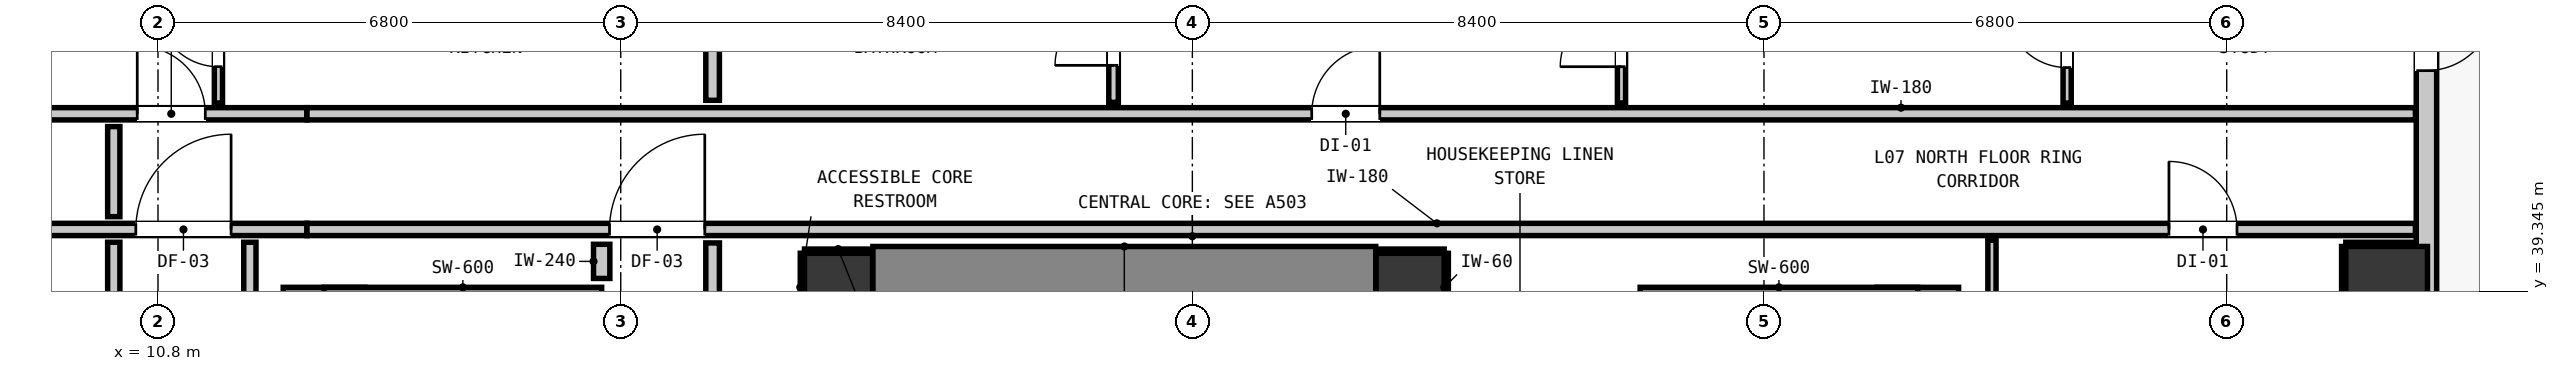
"""IFC4 building model, lengths in metres.
Left out: names, types, materials, properties, quantities, classifications, styles, units other than length and angle.
Written with IfcOpenShell. Run it as: python <this file> out.ifc"""

import sys

from ifc_helpers import new_model, si_unit, direction, frame, frame_2d, origin, origin_2d, place, context, subcontext, project, spatial, rectangle, extrude, element, fill, save


model = new_model("IFC4")
c1 = context("Model", 3, precision=1e-05, world=origin(), true_north=direction((0.0, 1.0)))
c2 = subcontext(c1, "Body", "Model", "MODEL_VIEW")
j1 = project(units=[si_unit("LENGTHUNIT", "METRE"), si_unit("PLANEANGLEUNIT", "RADIAN")], contexts=[c1])
p1 = place(None, origin())
s1 = spatial("IfcSite", under=j1, at=p1, CompositionType="ELEMENT")
p2 = place(p1, origin())
s2 = spatial("IfcBuilding", under=s1, at=p2, CompositionType="ELEMENT")
p3 = place(p2, frame((0.0, 0.0, 28.64)))
s3 = spatial("IfcBuildingStorey", under=s2, at=p3, CompositionType="ELEMENT", Elevation=28.64)
for number, where, z_axis, x_axis in (
    (1, (20.8, 39.4, 0.0), (0.0, 0.0, 1.0), (1.0, 0.0, 0.0)),
    (2, (29.2, 39.4, 0.0), (0.0, 0.0, 1.0), (1.0, 0.0, 0.0)),
):
    element("IfcColumn", number, at=place(p3, frame(where, z_axis=z_axis, x_axis=x_axis)), inside=s3, PredefinedType="COLUMN", context=c2, shape_type="SweptSolid", body=[
        extrude(rectangle(XDim=1.0, YDim=1.0, at=origin_2d()), origin(), (0.0, 0.0, 1.0), 3.32),
    ])
p4 = place(p3, frame((13.24, 31.205, 0.0), z_axis=(0.0, 0.0, 1.0), x_axis=(0.0, 1.0, 0.0)))
e3 = element("IfcWall", 3, at=p4, inside=s3, PredefinedType="SHEAR", context=c2, shape_type="SweptSolid", body=[
    extrude(rectangle(XDim=8.195, YDim=1.2, at=frame_2d((4.097, 0.0))), origin(), (0.0, 0.0, 1.0), 3.32),
])
p5 = place(p3, frame((13.24, 39.1, 0.0), z_axis=(0.0, 0.0, 1.0), x_axis=(1.0, 0.0, 0.0)))
e4 = element("IfcWall", 4, at=p5, inside=s3, PredefinedType="SHEAR", context=c2, shape_type="SweptSolid", body=[
    extrude(rectangle(XDim=4.08, YDim=0.6, at=frame_2d((2.04, 0.0))), origin(), (0.0, 0.0, 1.0), 3.32),
])
p6 = place(p3, frame((36.66, 31.205, 0.0), z_axis=(0.0, 0.0, 1.0), x_axis=(0.0, 1.0, 0.0)))
e5 = element("IfcWall", 5, at=p6, inside=s3, PredefinedType="SHEAR", context=c2, shape_type="SweptSolid", body=[
    extrude(rectangle(XDim=8.195, YDim=1.2, at=frame_2d((4.097, 0.0))), origin(), (0.0, 0.0, 1.0), 3.32),
])
p7 = place(p3, frame((32.58, 39.1, 0.0), z_axis=(0.0, 0.0, 1.0), x_axis=(1.0, 0.0, 0.0)))
e6 = element("IfcWall", 6, at=p7, inside=s3, PredefinedType="SHEAR", context=c2, shape_type="SweptSolid", body=[
    extrude(rectangle(XDim=4.08, YDim=0.6, at=frame_2d((2.04, 0.0))), origin(), (0.0, 0.0, 1.0), 3.32),
])
p8 = place(p3, frame((21.305, 39.4, 0.0), z_axis=(0.0, 0.0, 1.0), x_axis=(1.0, 0.0, 0.0)))
e7 = element("IfcWall", 7, at=p8, inside=s3, PredefinedType="SHEAR", context=c2, shape_type="SweptSolid", body=[
    extrude(rectangle(XDim=7.39, YDim=1.2, at=frame_2d((3.695, 0.0))), origin(), (0.0, 0.0, 1.0), 3.32),
])
p9 = place(p3, frame((43.55, 39.4, 0.0), z_axis=(0.0, 0.0, 1.0), x_axis=(1.0, 0.0, 0.0)))
e8 = element("IfcColumn", 8, at=p9, inside=s3, PredefinedType="COLUMN", context=c2, shape_type="SweptSolid", body=[
    extrude(rectangle(XDim=1.2, YDim=1.2, at=origin_2d()), origin(), (0.0, 0.0, 1.0), 3.32),
])
p10 = place(p3, frame((44.135, 44.835, 0.0), z_axis=(0.0, 0.0, 1.0), x_axis=(0.0, -1.0, 0.0)))
e9 = element("IfcWall", 9, at=p10, inside=s3, PredefinedType="STANDARD", context=c2, shape_type="SweptSolid", body=[
    extrude(rectangle(XDim=34.67, YDim=0.3, at=frame_2d((17.335, 0.0))), origin(), (0.0, 0.0, 1.0), 3.06),
])
p11 = place(p10, frame((1.251, 0.0, 0.0)))
e10 = element("IfcOpeningElement", 10, at=p11, cuts=e9, PredefinedType="OPENING", context=c2, shape_type="SweptSolid", body=[
    extrude(rectangle(XDim=1.0, YDim=2.15, at=frame_2d((0.5, 1.075))), frame((0.0, 0.16, 0.0), z_axis=(0.0, -1.0, 0.0), x_axis=(1.0, 0.0, 0.0)), (0.0, 0.0, 1.0), 0.32),
])
p12 = place(p10, frame((32.733, 0.0, 0.85)))
e11 = element("IfcOpeningElement", 11, at=p12, cuts=e9, PredefinedType="OPENING", context=c2, shape_type="SweptSolid", body=[
    extrude(rectangle(XDim=1.05, YDim=1.65, at=frame_2d((0.525, 0.825))), frame((0.0, 0.16, 0.0), z_axis=(0.0, -1.0, 0.0), x_axis=(1.0, 0.0, 0.0)), (0.0, 0.0, 1.0), 0.32),
])
p13 = place(p10, frame((17.135, 0.0, 0.85)))
e12 = element("IfcOpeningElement", 12, at=p13, cuts=e9, PredefinedType="OPENING", context=c2, shape_type="SweptSolid", body=[
    extrude(rectangle(XDim=2.7, YDim=2.0, at=frame_2d((1.35, 1.0))), frame((0.0, 0.16, 0.0), z_axis=(0.0, -1.0, 0.0), x_axis=(1.0, 0.0, 0.0)), (0.0, 0.0, 1.0), 0.32),
])
p14 = place(p10, frame((6.984, 0.0, 0.85)))
e13 = element("IfcOpeningElement", 13, at=p14, cuts=e9, PredefinedType="OPENING", context=c2, shape_type="SweptSolid", body=[
    extrude(rectangle(XDim=1.05, YDim=1.65, at=frame_2d((0.525, 0.825))), frame((0.0, 0.16, 0.0), z_axis=(0.0, -1.0, 0.0), x_axis=(1.0, 0.0, 0.0)), (0.0, 0.0, 1.0), 0.32),
])
p15 = place(p3, frame((2.661, 40.25, 0.0), z_axis=(0.0, 0.0, 1.0), x_axis=(1.0, 0.0, 0.0)))
e14 = element("IfcWall", 14, at=p15, inside=s3, PredefinedType="PARTITIONING", context=c2, shape_type="SweptSolid", body=[
    extrude(rectangle(XDim=10.328, YDim=0.18, at=frame_2d((5.164, 0.0))), origin(), (0.0, 0.0, 1.0), 2.445),
])
p16 = place(p15, frame((7.813, 0.0, 0.0)))
e15 = element("IfcOpeningElement", 15, at=p16, cuts=e14, PredefinedType="OPENING", context=c2, shape_type="SweptSolid", body=[
    extrude(rectangle(XDim=1.4, YDim=2.15, at=frame_2d((0.7, 1.075))), frame((0.0, 0.1, 0.0), z_axis=(0.0, -1.0, 0.0), x_axis=(1.0, 0.0, 0.0)), (0.0, 0.0, 1.0), 0.2),
])
p17 = place(p3, frame((12.989, 40.25, 0.0), z_axis=(0.0, 0.0, 1.0), x_axis=(1.0, 0.0, 0.0)))
e16 = element("IfcWall", 16, at=p17, inside=s3, PredefinedType="PARTITIONING", context=c2, shape_type="SweptSolid", body=[
    extrude(rectangle(XDim=30.984, YDim=0.18, at=frame_2d((15.492, 0.0))), origin(), (0.0, 0.0, 1.0), 3.06),
])
p18 = place(p17, frame((4.446, 0.0, 0.0)))
e17 = element("IfcOpeningElement", 17, at=p18, cuts=e16, PredefinedType="OPENING", context=c2, shape_type="SweptSolid", body=[
    extrude(rectangle(XDim=1.4, YDim=2.15, at=frame_2d((0.7, 1.075))), frame((0.0, 0.1, 0.0), z_axis=(0.0, -1.0, 0.0), x_axis=(1.0, 0.0, 0.0)), (0.0, 0.0, 1.0), 0.2),
])
p19 = place(p17, frame((27.362, 0.0, 0.0)))
e18 = element("IfcOpeningElement", 18, at=p19, cuts=e16, PredefinedType="OPENING", context=c2, shape_type="SweptSolid", body=[
    extrude(rectangle(XDim=1.0, YDim=2.15, at=frame_2d((0.5, 1.075))), frame((0.0, 0.1, 0.0), z_axis=(0.0, -1.0, 0.0), x_axis=(1.0, 0.0, 0.0)), (0.0, 0.0, 1.0), 0.2),
])
p20 = place(p3, frame((2.661, 41.95, 0.0), z_axis=(0.0, 0.0, 1.0), x_axis=(1.0, 0.0, 0.0)))
e19 = element("IfcWall", 19, at=p20, inside=s3, PredefinedType="PARTITIONING", context=c2, shape_type="SweptSolid", body=[
    extrude(rectangle(XDim=10.328, YDim=0.18, at=frame_2d((5.164, 0.0))), origin(), (0.0, 0.0, 1.0), 2.445),
])
p21 = place(p20, frame((7.834, 0.0, 0.0)))
e20 = element("IfcOpeningElement", 20, at=p21, cuts=e19, PredefinedType="OPENING", context=c2, shape_type="SweptSolid", body=[
    extrude(rectangle(XDim=1.0, YDim=2.15, at=frame_2d((0.5, 1.075))), frame((0.0, 0.1, 0.0), z_axis=(0.0, -1.0, 0.0), x_axis=(1.0, 0.0, 0.0)), (0.0, 0.0, 1.0), 0.2),
])
p22 = place(p3, frame((12.989, 41.95, 0.0), z_axis=(0.0, 0.0, 1.0), x_axis=(1.0, 0.0, 0.0)))
e21 = element("IfcWall", 21, at=p22, inside=s3, PredefinedType="PARTITIONING", context=c2, shape_type="SweptSolid", body=[
    extrude(rectangle(XDim=30.984, YDim=0.18, at=frame_2d((15.492, 0.0))), origin(), (0.0, 0.0, 1.0), 3.06),
])
p23 = place(p22, frame((14.765, 0.0, 0.0)))
e22 = element("IfcOpeningElement", 22, at=p23, cuts=e21, PredefinedType="OPENING", context=c2, shape_type="SweptSolid", body=[
    extrude(rectangle(XDim=1.0, YDim=2.15, at=frame_2d((0.5, 1.075))), frame((0.0, 0.1, 0.0), z_axis=(0.0, -1.0, 0.0), x_axis=(1.0, 0.0, 0.0)), (0.0, 0.0, 1.0), 0.2),
])
p24 = place(p3, frame((17.32, 39.53, 0.0), z_axis=(0.0, 0.0, 1.0), x_axis=(0.0, 1.0, 0.0)))
e23 = element("IfcWall", 23, at=p24, inside=s3, PredefinedType="PARTITIONING", context=c2, shape_type="SweptSolid", body=[
    extrude(rectangle(XDim=0.502, YDim=0.24, at=frame_2d((0.251, 0.0))), origin(), (0.0, 0.0, 1.0), 3.06),
])
p25 = place(p3, frame((18.95, 38.928, 0.0), z_axis=(0.0, 0.0, 1.0), x_axis=(0.0, 1.0, 0.0)))
e24 = element("IfcWall", 24, at=p25, inside=s3, PredefinedType="PARTITIONING", context=c2, shape_type="SweptSolid", body=[
    extrude(rectangle(XDim=1.124, YDim=0.2, at=frame_2d((0.562, 0.0))), origin(), (0.0, 0.0, 1.0), 3.06),
])
p26 = place(p3, frame((18.95, 42.148, 0.0), z_axis=(0.0, 0.0, 1.0), x_axis=(0.0, 1.0, 0.0)))
e25 = element("IfcWall", 25, at=p26, inside=s3, PredefinedType="PARTITIONING", context=c2, shape_type="SweptSolid", body=[
    extrude(rectangle(XDim=1.882, YDim=0.2, at=frame_2d((0.941, 0.0))), origin(), (0.0, 0.0, 1.0), 3.06),
])
p27 = place(p3, frame((10.15, 34.688, 0.0), z_axis=(0.0, 0.0, 1.0), x_axis=(0.0, 1.0, 0.0)))
e26 = element("IfcWall", 26, at=p27, inside=s3, PredefinedType="PARTITIONING", context=c2, shape_type="SweptSolid", body=[
    extrude(rectangle(XDim=5.374, YDim=0.18, at=frame_2d((2.687, 0.0))), origin(), (0.0, 0.0, 1.0), 3.06),
])
p28 = place(p3, frame((10.15, 40.438, 0.0), z_axis=(0.0, 0.0, 1.0), x_axis=(0.0, 1.0, 0.0)))
e27 = element("IfcWall", 27, at=p28, inside=s3, PredefinedType="PARTITIONING", context=c2, shape_type="SweptSolid", body=[
    extrude(rectangle(XDim=1.324, YDim=0.18, at=frame_2d((0.662, 0.0))), origin(), (0.0, 0.0, 1.0), 3.06),
])
p29 = place(p3, frame((12.15, 21.368, 0.0), z_axis=(0.0, 0.0, 1.0), x_axis=(0.0, 1.0, 0.0)))
e28 = element("IfcWall", 28, at=p29, inside=s3, PredefinedType="PARTITIONING", context=c2, shape_type="SweptSolid", body=[
    extrude(rectangle(XDim=18.694, YDim=0.18, at=frame_2d((9.347, 0.0))), origin(), (0.0, 0.0, 1.0), 3.06),
])
p30 = place(p3, frame((24.842, 42.118, 0.0), z_axis=(0.0, 0.0, 1.0), x_axis=(0.0, 1.0, 0.0)))
e29 = element("IfcWall", 29, at=p30, inside=s3, PredefinedType="PARTITIONING", context=c2, shape_type="SweptSolid", body=[
    extrude(rectangle(XDim=1.942, YDim=0.14, at=frame_2d((0.971, 0.0))), origin(), (0.0, 0.0, 1.0), 3.06),
])
p31 = place(p30, frame((0.544, 0.0, 0.0)))
e30 = element("IfcOpeningElement", 30, at=p31, cuts=e29, PredefinedType="OPENING", context=c2, shape_type="SweptSolid", body=[
    extrude(rectangle(XDim=0.86, YDim=2.02, at=frame_2d((0.43, 1.01))), frame((0.0, 0.08, 0.0), z_axis=(0.0, -1.0, 0.0), x_axis=(1.0, 0.0, 0.0)), (0.0, 0.0, 1.0), 0.16),
])
p32 = place(p3, frame((11.688, 42.108, 0.0), z_axis=(0.0, 0.0, 1.0), x_axis=(0.0, 1.0, 0.0)))
e31 = element("IfcWall", 31, at=p32, inside=s3, PredefinedType="PARTITIONING", context=c2, shape_type="SweptSolid", body=[
    extrude(rectangle(XDim=5.065, YDim=0.12, at=frame_2d((2.533, 0.0))), origin(), (0.0, 0.0, 1.0), 3.06),
])
p33 = place(p32, frame((0.534, 0.0, 0.0)))
e32 = element("IfcOpeningElement", 32, at=p33, cuts=e31, PredefinedType="OPENING", context=c2, shape_type="SweptSolid", body=[
    extrude(rectangle(XDim=0.9, YDim=2.1, at=frame_2d((0.45, 1.05))), frame((0.0, 0.07, 0.0), z_axis=(0.0, -1.0, 0.0), x_axis=(1.0, 0.0, 0.0)), (0.0, 0.0, 1.0), 0.14),
])
p34 = place(p32, frame((2.893, 0.0, 0.0)))
e33 = element("IfcOpeningElement", 33, at=p34, cuts=e31, PredefinedType="OPENING", context=c2, shape_type="SweptSolid", body=[
    extrude(rectangle(XDim=0.9, YDim=2.1, at=frame_2d((0.45, 1.05))), frame((0.0, 0.07, 0.0), z_axis=(0.0, -1.0, 0.0), x_axis=(1.0, 0.0, 0.0)), (0.0, 0.0, 1.0), 0.14),
])
p35 = place(p3, frame((32.306, 42.108, 0.0), z_axis=(0.0, 0.0, 1.0), x_axis=(0.0, 1.0, 0.0)))
e34 = element("IfcWall", 34, at=p35, inside=s3, PredefinedType="PARTITIONING", context=c2, shape_type="SweptSolid", body=[
    extrude(rectangle(XDim=1.962, YDim=0.12, at=frame_2d((0.981, 0.0))), origin(), (0.0, 0.0, 1.0), 3.06),
])
p36 = place(p35, frame((0.534, 0.0, 0.0)))
e35 = element("IfcOpeningElement", 35, at=p36, cuts=e34, PredefinedType="OPENING", context=c2, shape_type="SweptSolid", body=[
    extrude(rectangle(XDim=0.9, YDim=2.1, at=frame_2d((0.45, 1.05))), frame((0.0, 0.07, 0.0), z_axis=(0.0, -1.0, 0.0), x_axis=(1.0, 0.0, 0.0)), (0.0, 0.0, 1.0), 0.14),
])
p37 = place(p3, frame((37.75, 35.818, 0.0), z_axis=(0.0, 0.0, 1.0), x_axis=(0.0, 1.0, 0.0)))
e36 = element("IfcWall", 36, at=p37, inside=s3, PredefinedType="PARTITIONING", context=c2, shape_type="SweptSolid", body=[
    extrude(rectangle(XDim=4.274, YDim=0.12, at=frame_2d((2.137, 0.0))), origin(), (0.0, 0.0, 1.0), 3.06),
])
p38 = place(p3, frame((38.855, 42.108, 0.0), z_axis=(0.0, 0.0, 1.0), x_axis=(0.0, 1.0, 0.0)))
e37 = element("IfcWall", 37, at=p38, inside=s3, PredefinedType="PARTITIONING", context=c2, shape_type="SweptSolid", body=[
    extrude(rectangle(XDim=1.962, YDim=0.12, at=frame_2d((0.981, 0.0))), origin(), (0.0, 0.0, 1.0), 3.06),
])
p39 = place(p38, frame((0.521, 0.0, 0.0)))
e38 = element("IfcOpeningElement", 38, at=p39, cuts=e37, PredefinedType="OPENING", context=c2, shape_type="SweptSolid", body=[
    extrude(rectangle(XDim=0.9, YDim=2.1, at=frame_2d((0.45, 1.05))), frame((0.0, 0.07, 0.0), z_axis=(0.0, -1.0, 0.0), x_axis=(1.0, 0.0, 0.0)), (0.0, 0.0, 1.0), 0.14),
])
p40 = place(p3, frame((20.3, 39.932, 0.0), z_axis=(0.0, 0.0, 1.0), x_axis=(1.0, 0.0, 0.0)))
e39 = element("IfcWall", 39, at=p40, inside=s3, PredefinedType="PARTITIONING", context=c2, shape_type="SweptSolid", body=[
    extrude(rectangle(XDim=0.99, YDim=0.06, at=frame_2d((0.495, 0.0))), origin(), (0.0, 0.0, 1.0), 1.45),
])
p41 = place(p3, frame((20.268, 38.9, 0.0), z_axis=(0.0, 0.0, 1.0), x_axis=(0.0, 1.0, 0.0)))
e40 = element("IfcWall", 40, at=p41, inside=s3, PredefinedType="PARTITIONING", context=c2, shape_type="SweptSolid", body=[
    extrude(rectangle(XDim=1.0, YDim=0.06, at=frame_2d((0.5, 0.0))), origin(), (0.0, 0.0, 1.0), 1.45),
])
p42 = place(p3, frame((28.71, 39.932, 0.0), z_axis=(0.0, 0.0, 1.0), x_axis=(1.0, 0.0, 0.0)))
e41 = element("IfcWall", 41, at=p42, inside=s3, PredefinedType="PARTITIONING", context=c2, shape_type="SweptSolid", body=[
    extrude(rectangle(XDim=0.99, YDim=0.06, at=frame_2d((0.495, 0.0))), origin(), (0.0, 0.0, 1.0), 1.45),
])
p43 = place(p3, frame((29.732, 38.9, 0.0), z_axis=(0.0, 0.0, 1.0), x_axis=(0.0, 1.0, 0.0)))
e42 = element("IfcWall", 42, at=p43, inside=s3, PredefinedType="PARTITIONING", context=c2, shape_type="SweptSolid", body=[
    extrude(rectangle(XDim=1.0, YDim=0.06, at=frame_2d((0.5, 0.0))), origin(), (0.0, 0.0, 1.0), 1.45),
])
p44 = place(p3, frame((42.95, 40.032, 0.0), z_axis=(0.0, 0.0, 1.0), x_axis=(1.0, 0.0, 0.0)))
e43 = element("IfcWall", 43, at=p44, inside=s3, PredefinedType="PARTITIONING", context=c2, shape_type="SweptSolid", body=[
    extrude(rectangle(XDim=1.02, YDim=0.06, at=frame_2d((0.51, 0.0))), origin(), (0.0, 0.0, 1.0), 1.45),
])
p45 = place(p3, frame((42.918, 38.8, 0.0), z_axis=(0.0, 0.0, 1.0), x_axis=(0.0, 1.0, 0.0)))
e44 = element("IfcWall", 44, at=p45, inside=s3, PredefinedType="PARTITIONING", context=c2, shape_type="SweptSolid", body=[
    extrude(rectangle(XDim=1.2, YDim=0.06, at=frame_2d((0.6, 0.0))), origin(), (0.0, 0.0, 1.0), 1.45),
])
p46 = place(p11, origin())
e45 = element("IfcDoor", 45, at=p46, inside=s3, OperationType="SINGLE_SWING_LEFT", PredefinedType="DOOR", context=c2, shape_type="SweptSolid", body=[
    extrude(rectangle(XDim=1.0, YDim=2.15, at=frame_2d((0.5, 1.075))), frame((0.0, 0.025, 0.0), z_axis=(0.0, -1.0, 0.0), x_axis=(1.0, 0.0, 0.0)), (0.0, 0.0, 1.0), 0.05),
])
fill(e10, e45)
p47 = place(p18, origin())
e46 = element("IfcDoor", 46, at=p47, inside=s3, OperationType="SINGLE_SWING_RIGHT", PredefinedType="DOOR", context=c2, shape_type="SweptSolid", body=[
    extrude(rectangle(XDim=1.4, YDim=2.15, at=frame_2d((0.7, 1.075))), frame((0.0, 0.025, 0.0), z_axis=(0.0, -1.0, 0.0), x_axis=(1.0, 0.0, 0.0)), (0.0, 0.0, 1.0), 0.05),
])
fill(e17, e46)
p48 = place(p16, origin())
e47 = element("IfcDoor", 47, at=p48, inside=s3, OperationType="SINGLE_SWING_RIGHT", PredefinedType="DOOR", context=c2, shape_type="SweptSolid", body=[
    extrude(rectangle(XDim=1.4, YDim=2.15, at=frame_2d((0.7, 1.075))), frame((0.0, 0.025, 0.0), z_axis=(0.0, -1.0, 0.0), x_axis=(1.0, 0.0, 0.0)), (0.0, 0.0, 1.0), 0.05),
])
fill(e15, e47)
p49 = place(p21, origin())
e48 = element("IfcDoor", 48, at=p49, inside=s3, OperationType="SINGLE_SWING_LEFT", PredefinedType="DOOR", context=c2, shape_type="SweptSolid", body=[
    extrude(rectangle(XDim=1.0, YDim=2.15, at=frame_2d((0.5, 1.075))), frame((0.0, 0.025, 0.0), z_axis=(0.0, -1.0, 0.0), x_axis=(1.0, 0.0, 0.0)), (0.0, 0.0, 1.0), 0.05),
])
fill(e20, e48)
p50 = place(p33, origin())
e49 = element("IfcDoor", 49, at=p50, inside=s3, OperationType="SINGLE_SWING_RIGHT", PredefinedType="DOOR", context=c2, shape_type="SweptSolid", body=[
    extrude(rectangle(XDim=0.9, YDim=2.1, at=frame_2d((0.45, 1.05))), frame((0.0, 0.025, 0.0), z_axis=(0.0, -1.0, 0.0), x_axis=(1.0, 0.0, 0.0)), (0.0, 0.0, 1.0), 0.05),
])
fill(e32, e49)
p51 = place(p23, origin())
e50 = element("IfcDoor", 50, at=p51, inside=s3, OperationType="SINGLE_SWING_RIGHT", PredefinedType="DOOR", context=c2, shape_type="SweptSolid", body=[
    extrude(rectangle(XDim=1.0, YDim=2.15, at=frame_2d((0.5, 1.075))), frame((0.0, 0.025, 0.0), z_axis=(0.0, -1.0, 0.0), x_axis=(1.0, 0.0, 0.0)), (0.0, 0.0, 1.0), 0.05),
])
fill(e22, e50)
p52 = place(p31, origin())
e51 = element("IfcDoor", 51, at=p52, inside=s3, OperationType="SINGLE_SWING_LEFT", PredefinedType="DOOR", context=c2, shape_type="SweptSolid", body=[
    extrude(rectangle(XDim=0.86, YDim=2.02, at=frame_2d((0.43, 1.01))), frame((0.0, 0.025, 0.0), z_axis=(0.0, -1.0, 0.0), x_axis=(1.0, 0.0, 0.0)), (0.0, 0.0, 1.0), 0.05),
])
fill(e30, e51)
p53 = place(p36, origin())
e52 = element("IfcDoor", 52, at=p53, inside=s3, OperationType="SINGLE_SWING_LEFT", PredefinedType="DOOR", context=c2, shape_type="SweptSolid", body=[
    extrude(rectangle(XDim=0.9, YDim=2.1, at=frame_2d((0.45, 1.05))), frame((0.0, 0.025, 0.0), z_axis=(0.0, -1.0, 0.0), x_axis=(1.0, 0.0, 0.0)), (0.0, 0.0, 1.0), 0.05),
])
fill(e35, e52)
p54 = place(p39, origin())
e53 = element("IfcDoor", 53, at=p54, inside=s3, OperationType="SINGLE_SWING_RIGHT", PredefinedType="DOOR", context=c2, shape_type="SweptSolid", body=[
    extrude(rectangle(XDim=0.9, YDim=2.1, at=frame_2d((0.45, 1.05))), frame((0.0, 0.025, 0.0), z_axis=(0.0, -1.0, 0.0), x_axis=(1.0, 0.0, 0.0)), (0.0, 0.0, 1.0), 0.05),
])
fill(e38, e53)
p55 = place(p19, origin())
e54 = element("IfcDoor", 54, at=p55, inside=s3, OperationType="SINGLE_SWING_LEFT", PredefinedType="DOOR", context=c2, shape_type="SweptSolid", body=[
    extrude(rectangle(XDim=1.0, YDim=2.15, at=frame_2d((0.5, 1.075))), frame((0.0, 0.025, 0.0), z_axis=(0.0, -1.0, 0.0), x_axis=(1.0, 0.0, 0.0)), (0.0, 0.0, 1.0), 0.05),
])
fill(e18, e54)
save(model, sys.argv[1])
